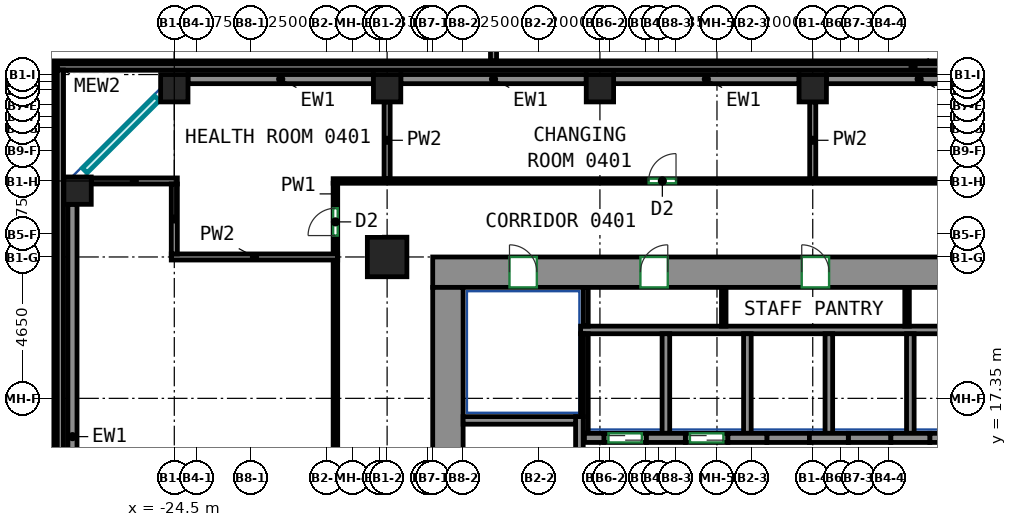
"""IFC4 building model, lengths in metres.
Left out: names, types, materials, properties, quantities, classifications, styles, units other than length and angle.
Written with IfcOpenShell. Run it as: python <this file> out.ifc"""

import sys

from ifc_helpers import new_model, si_unit, direction, frame, frame_2d, origin, origin_2d, place, context, subcontext, project, spatial, rectangle, extrude, source, transform, mapped, element, fill, save


model = new_model("IFC4")
c1 = context("Model", 3, precision=1e-05, world=origin(), true_north=direction((0.0, 1.0)))
c2 = subcontext(c1, "Body", "Model", "MODEL_VIEW")
j1 = project(units=[si_unit("LENGTHUNIT", "METRE"), si_unit("PLANEANGLEUNIT", "RADIAN")], contexts=[c1])
p1 = place(None, origin())
s1 = spatial("IfcSite", under=j1, at=p1, CompositionType="ELEMENT")
p2 = place(p1, origin())
s2 = spatial("IfcBuilding", under=s1, at=p2, CompositionType="ELEMENT")
p3 = place(p2, frame((0.0, 0.0, 22.5)))
s3 = spatial("IfcBuildingStorey", under=s2, at=p3, CompositionType="ELEMENT", Elevation=22.5)
m1 = source(origin(), c2, "Body", "SweptSolid", [
    extrude(rectangle(XDim=0.9, YDim=0.9, at=origin_2d()), origin(), (0.0, 0.0, 1.0), 4.22),
])
for number, where, z_axis, x_axis in (
    (1, (-27.682, 24.182, 0.0), (0.0, 0.0, 1.0), (1.0, 0.0, 0.0)),
    (2, (-24.5, 27.55, 0.0), (0.0, 0.0, 1.0), (1.0, 0.0, 0.0)),
):
    element("IfcColumn", number, at=place(p3, frame(where, z_axis=z_axis, x_axis=x_axis)), inside=s3, PredefinedType="COLUMN", context=c2, shape_type="MappedRepresentation", body=[
        mapped(m1, transform((0.0, 0.0, 0.0))),
    ])
m2 = source(origin(), c2, "Body", "SweptSolid", [
    extrude(rectangle(XDim=1.3, YDim=1.3, at=origin_2d()), origin(), (0.0, 0.0, 1.0), 4.22),
])
p4 = place(p3, frame((-17.5, 22.0, 0.0), z_axis=(0.0, 0.0, 1.0), x_axis=(1.0, 0.0, 0.0)))
e3 = element("IfcColumn", 3, at=p4, inside=s3, PredefinedType="COLUMN", context=c2, shape_type="MappedRepresentation", body=[
    mapped(m2, transform((0.0, 0.0, 0.0))),
])
for number, where, z_axis, x_axis in (
    (4, (-17.5, 27.55, 0.0), (0.0, 0.0, 1.0), (1.0, 0.0, 0.0)),
    (5, (-10.5, 27.55, 0.0), (0.0, 0.0, 1.0), (1.0, 0.0, 0.0)),
    (6, (-3.5, 27.55, 0.0), (0.0, 0.0, 1.0), (1.0, 0.0, 0.0)),
):
    element("IfcColumn", number, at=place(p3, frame(where, z_axis=z_axis, x_axis=x_axis)), inside=s3, PredefinedType="COLUMN", context=c2, shape_type="MappedRepresentation", body=[
        mapped(m1, transform((0.0, 0.0, 0.0))),
    ])
m3 = source(origin(), c2, "Body", "SweptSolid", [
    extrude(rectangle(XDim=34.1, YDim=1.0, at=frame_2d((17.05, 0.0))), origin(), (0.0, 0.0, 1.0), 4.22),
])
p5 = place(p3, frame((-16.0, 21.5, 0.0), z_axis=(0.0, 0.0, 1.0), x_axis=(1.0, 0.0, 0.0)))
e7 = element("IfcWall", 7, at=p5, inside=s3, PredefinedType="SHEAR", context=c2, shape_type="MappedRepresentation", body=[
    mapped(m3, transform((0.0, 0.0, 0.0))),
])
p6 = place(p5, frame((6.831, 0.0, 0.0)))
e8 = element("IfcOpeningElement", 8, at=p6, cuts=e7, PredefinedType="OPENING", context=c2, shape_type="SweptSolid", body=[
    extrude(rectangle(XDim=0.9, YDim=2.1, at=frame_2d((0.45, 1.05))), frame((0.0, 0.51, 0.0), z_axis=(0.0, -1.0, 0.0), x_axis=(1.0, 0.0, 0.0)), (0.0, 0.0, 1.0), 1.02),
])
p7 = place(p5, frame((12.138, 0.0, 0.0)))
e9 = element("IfcOpeningElement", 9, at=p7, cuts=e7, PredefinedType="OPENING", context=c2, shape_type="SweptSolid", body=[
    extrude(rectangle(XDim=0.9, YDim=2.1, at=frame_2d((0.45, 1.05))), frame((0.0, 0.51, 0.0), z_axis=(0.0, -1.0, 0.0), x_axis=(1.0, 0.0, 0.0)), (0.0, 0.0, 1.0), 1.02),
])
p8 = place(p5, frame((17.565, 0.0, 0.0)))
e10 = element("IfcOpeningElement", 10, at=p8, cuts=e7, PredefinedType="OPENING", context=c2, shape_type="SweptSolid", body=[
    extrude(rectangle(XDim=0.9, YDim=2.1, at=frame_2d((0.45, 1.05))), frame((0.0, 0.51, 0.0), z_axis=(0.0, -1.0, 0.0), x_axis=(1.0, 0.0, 0.0)), (0.0, 0.0, 1.0), 1.02),
])
p9 = place(p5, frame((21.786, 0.0, 0.0)))
e11 = element("IfcOpeningElement", 11, at=p9, cuts=e7, PredefinedType="OPENING", context=c2, shape_type="SweptSolid", body=[
    extrude(rectangle(XDim=0.9, YDim=2.1, at=frame_2d((0.45, 1.05))), frame((0.0, 0.51, 0.0), z_axis=(0.0, -1.0, 0.0), x_axis=(1.0, 0.0, 0.0)), (0.0, 0.0, 1.0), 1.02),
])
p10 = place(p5, frame((26.127, 0.0, 0.0)))
e12 = element("IfcOpeningElement", 12, at=p10, cuts=e7, PredefinedType="OPENING", context=c2, shape_type="SweptSolid", body=[
    extrude(rectangle(XDim=0.9, YDim=2.1, at=frame_2d((0.45, 1.05))), frame((0.0, 0.51, 0.0), z_axis=(0.0, -1.0, 0.0), x_axis=(1.0, 0.0, 0.0)), (0.0, 0.0, 1.0), 1.02),
])
p11 = place(p5, frame((2.525, 0.0, 0.0)))
e13 = element("IfcOpeningElement", 13, at=p11, cuts=e7, PredefinedType="OPENING", context=c2, shape_type="SweptSolid", body=[
    extrude(rectangle(XDim=0.9, YDim=2.1, at=frame_2d((0.45, 1.05))), frame((0.0, 0.51, 0.0), z_axis=(0.0, -1.0, 0.0), x_axis=(1.0, 0.0, 0.0)), (0.0, 0.0, 1.0), 1.02),
])
p12 = place(p5, frame((30.675, 0.0, 0.0)))
e14 = element("IfcOpeningElement", 14, at=p12, cuts=e7, PredefinedType="OPENING", context=c2, shape_type="SweptSolid", body=[
    extrude(rectangle(XDim=0.9, YDim=2.1, at=frame_2d((0.45, 1.05))), frame((0.0, 0.51, 0.0), z_axis=(0.0, -1.0, 0.0), x_axis=(1.0, 0.0, 0.0)), (0.0, 0.0, 1.0), 1.02),
])
m4 = source(origin(), c2, "Body", "SweptSolid", [
    extrude(rectangle(XDim=12.0, YDim=1.0, at=frame_2d((6.0, 0.0))), origin(), (0.0, 0.0, 1.0), 4.22),
])
p13 = place(p3, frame((-15.5, 9.0, 0.0), z_axis=(0.0, 0.0, 1.0), x_axis=(0.0, 1.0, 0.0)))
e15 = element("IfcWall", 15, at=p13, inside=s3, PredefinedType="SHEAR", context=c2, shape_type="MappedRepresentation", body=[
    mapped(m4, transform((0.0, 0.0, 0.0))),
])
m5 = source(origin(), c2, "Body", "SweptSolid", [
    extrude(rectangle(XDim=7.75, YDim=0.25, at=frame_2d((3.875, 0.0))), origin(), (0.0, 0.0, 1.0), 4.22),
])
p14 = place(p3, frame((-11.175, 9.0, 0.0), z_axis=(0.0, 0.0, 1.0), x_axis=(0.0, 1.0, 0.0)))
e16 = element("IfcWall", 16, at=p14, inside=s3, PredefinedType="SHEAR", context=c2, shape_type="MappedRepresentation", body=[
    mapped(m5, transform((0.0, 0.0, 0.0))),
])
m6 = source(origin(), c2, "Body", "SweptSolid", [
    extrude(rectangle(XDim=3.7, YDim=0.25, at=frame_2d((1.85, 0.0))), origin(), (0.0, 0.0, 1.0), 4.22),
])
p15 = place(p3, frame((-15.0, 16.625, 0.0), z_axis=(0.0, 0.0, 1.0), x_axis=(1.0, 0.0, 0.0)))
e17 = element("IfcWall", 17, at=p15, inside=s3, PredefinedType="SHEAR", context=c2, shape_type="MappedRepresentation", body=[
    mapped(m6, transform((0.0, 0.0, 0.0))),
])
m7 = source(origin(), c2, "Body", "SweptSolid", [
    extrude(rectangle(XDim=0.64, YDim=0.3, at=frame_2d((0.32, 0.0))), origin(), (0.0, 0.0, 1.0), 4.22),
])
p16 = place(p3, frame((-11.01, 16.05, 0.0), z_axis=(0.0, 0.0, 1.0), x_axis=(1.0, 0.0, 0.0)))
e18 = element("IfcWall", 18, at=p16, inside=s3, PredefinedType="SHEAR", context=c2, shape_type="MappedRepresentation", body=[
    mapped(m7, transform((0.0, 0.0, 0.0))),
])
m8 = source(origin(), c2, "Body", "SweptSolid", [
    extrude(rectangle(XDim=1.28, YDim=0.3, at=frame_2d((0.64, 0.0))), origin(), (0.0, 0.0, 1.0), 4.22),
])
for number, where, z_axis, x_axis in (
    (19, (-8.97, 16.05, 0.0), (0.0, 0.0, 1.0), (1.0, 0.0, 0.0)),
    (20, (-6.29, 16.05, 0.0), (0.0, 0.0, 1.0), (1.0, 0.0, 0.0)),
    (21, (-3.61, 16.05, 0.0), (0.0, 0.0, 1.0), (1.0, 0.0, 0.0)),
    (22, (-0.93, 16.05, 0.0), (0.0, 0.0, 1.0), (1.0, 0.0, 0.0)),
):
    element("IfcWall", number, at=place(p3, frame(where, z_axis=z_axis, x_axis=x_axis)), inside=s3, PredefinedType="SHEAR", context=c2, shape_type="MappedRepresentation", body=[
        mapped(m8, transform((0.0, 0.0, 0.0))),
    ])
m9 = source(origin(), c2, "Body", "SweptSolid", [
    extrude(rectangle(XDim=6.1, YDim=0.3, at=frame_2d((3.05, 0.0))), origin(), (0.0, 0.0, 1.0), 4.22),
])
for number, where, z_axis, x_axis in (
    (23, (3.05, 27.85, 0.0), (0.0, 0.0, 1.0), (-1.0, 0.0, 0.0)),
    (24, (-3.95, 27.85, 0.0), (0.0, 0.0, 1.0), (-1.0, 0.0, 0.0)),
    (25, (-10.95, 27.85, 0.0), (0.0, 0.0, 1.0), (-1.0, 0.0, 0.0)),
    (26, (-17.95, 27.85, 0.0), (0.0, 0.0, 1.0), (-1.0, 0.0, 0.0)),
):
    element("IfcWall", number, at=place(p3, frame(where, z_axis=z_axis, x_axis=x_axis)), inside=s3, PredefinedType="SOLIDWALL", context=c2, shape_type="MappedRepresentation", body=[
        mapped(m9, transform((0.0, 0.0, 0.0))),
    ])
m10 = source(origin(), c2, "Body", "SweptSolid", [
    extrude(rectangle(XDim=15.282, YDim=0.3, at=frame_2d((7.641, 0.0))), origin(), (0.0, 0.0, 1.0), 4.22),
])
p17 = place(p3, frame((-27.85, 23.732, 0.0), z_axis=(0.0, 0.0, 1.0), x_axis=(0.0, -1.0, 0.0)))
e27 = element("IfcWall", 27, at=p17, inside=s3, PredefinedType="SOLIDWALL", context=c2, shape_type="MappedRepresentation", body=[
    mapped(m10, transform((0.0, 0.0, 0.0))),
])
m11 = source(origin(), c2, "Body", "SweptSolid", [
    extrude(rectangle(XDim=56.3, YDim=0.3, at=frame_2d((28.15, 0.0))), origin(), (0.0, 0.0, 1.0), 4.22),
])
p18 = place(p3, frame((27.85, 28.3, 0.0), z_axis=(0.0, 0.0, 1.0), x_axis=(-1.0, 0.0, 0.0)))
e28 = element("IfcWall", 28, at=p18, inside=s3, PredefinedType="SOLIDWALL", context=c2, shape_type="MappedRepresentation", body=[
    mapped(m11, transform((0.0, 0.0, 0.0))),
])
m12 = source(origin(), c2, "Body", "SweptSolid", [
    extrude(rectangle(XDim=56.3, YDim=0.3, at=frame_2d((28.15, 0.0))), origin(), (0.0, 0.0, 1.0), 4.22),
])
p19 = place(p3, frame((-28.3, 28.15, 0.0), z_axis=(0.0, 0.0, 1.0), x_axis=(0.0, -1.0, 0.0)))
e29 = element("IfcWall", 29, at=p19, inside=s3, PredefinedType="SOLIDWALL", context=c2, shape_type="MappedRepresentation", body=[
    mapped(m12, transform((0.0, 0.0, 0.0))),
])
m13 = source(origin(), c2, "Body", "SweptSolid", [
    extrude(rectangle(XDim=56.3, YDim=0.2, at=frame_2d((28.15, 0.0))), origin(), (0.0, 0.0, 1.0), 1.1),
])
p20 = place(p3, frame((27.95, 28.25, 4.5), z_axis=(0.0, 0.0, 1.0), x_axis=(-1.0, 0.0, 0.0)))
e30 = element("IfcWall", 30, at=p20, inside=s3, PredefinedType="PARAPET", context=c2, shape_type="MappedRepresentation", body=[
    mapped(m13, transform((0.0, 0.0, 0.0))),
])
m14 = source(origin(), c2, "Body", "SweptSolid", [
    extrude(rectangle(XDim=56.3, YDim=0.2, at=frame_2d((28.15, 0.0))), origin(), (0.0, 0.0, 1.0), 1.1),
])
p21 = place(p3, frame((-28.25, 28.15, 4.5), z_axis=(0.0, 0.0, 1.0), x_axis=(0.0, -1.0, 0.0)))
e31 = element("IfcWall", 31, at=p21, inside=s3, PredefinedType="PARAPET", context=c2, shape_type="MappedRepresentation", body=[
    mapped(m14, transform((0.0, 0.0, 0.0))),
])
m15 = source(origin(), c2, "Body", "SweptSolid", [
    extrude(rectangle(XDim=1.4, YDim=0.3, at=frame_2d((0.7, 0.0))), origin(), (0.0, 0.0, 1.0), 4.22),
])
p22 = place(p3, frame((-10.37, 16.05, 0.0), z_axis=(0.0, 0.0, 1.0), x_axis=(1.0, 0.0, 0.0)))
e32 = element("IfcWall", 32, at=p22, inside=s3, PredefinedType="PARTITIONING", context=c2, shape_type="MappedRepresentation", body=[
    mapped(m15, transform((0.0, 0.0, 0.0))),
])
p23 = place(p22, frame((0.15, 0.0, 0.0)))
e33 = element("IfcOpeningElement", 33, at=p23, cuts=e32, PredefinedType="OPENING", context=c2, shape_type="SweptSolid", body=[
    extrude(rectangle(XDim=1.1, YDim=2.1, at=frame_2d((0.55, 1.05))), frame((0.0, 0.16, 0.0), z_axis=(0.0, -1.0, 0.0), x_axis=(1.0, 0.0, 0.0)), (0.0, 0.0, 1.0), 0.32),
])
m16 = source(origin(), c2, "Body", "SweptSolid", [
    extrude(rectangle(XDim=1.4, YDim=0.3, at=frame_2d((0.7, 0.0))), origin(), (0.0, 0.0, 1.0), 4.22),
])
p24 = place(p3, frame((-7.69, 16.05, 0.0), z_axis=(0.0, 0.0, 1.0), x_axis=(1.0, 0.0, 0.0)))
e34 = element("IfcWall", 34, at=p24, inside=s3, PredefinedType="PARTITIONING", context=c2, shape_type="MappedRepresentation", body=[
    mapped(m16, transform((0.0, 0.0, 0.0))),
])
p25 = place(p24, frame((0.15, 0.0, 0.0)))
e35 = element("IfcOpeningElement", 35, at=p25, cuts=e34, PredefinedType="OPENING", context=c2, shape_type="SweptSolid", body=[
    extrude(rectangle(XDim=1.1, YDim=2.1, at=frame_2d((0.55, 1.05))), frame((0.0, 0.16, 0.0), z_axis=(0.0, -1.0, 0.0), x_axis=(1.0, 0.0, 0.0)), (0.0, 0.0, 1.0), 0.32),
])
p26 = place(p3, frame((-5.01, 16.05, 0.0), z_axis=(0.0, 0.0, 1.0), x_axis=(1.0, 0.0, 0.0)))
e36 = element("IfcWall", 36, at=p26, inside=s3, PredefinedType="PARTITIONING", context=c2, shape_type="MappedRepresentation", body=[
    mapped(m16, transform((0.0, 0.0, 0.0))),
])
p27 = place(p3, frame((-2.33, 16.05, 0.0), z_axis=(0.0, 0.0, 1.0), x_axis=(1.0, 0.0, 0.0)))
e37 = element("IfcWall", 37, at=p27, inside=s3, PredefinedType="PARTITIONING", context=c2, shape_type="MappedRepresentation", body=[
    mapped(m15, transform((0.0, 0.0, 0.0))),
])
p28 = place(p3, frame((0.35, 16.05, 0.0), z_axis=(0.0, 0.0, 1.0), x_axis=(1.0, 0.0, 0.0)))
e38 = element("IfcWall", 38, at=p28, inside=s3, PredefinedType="PARTITIONING", context=c2, shape_type="MappedRepresentation", body=[
    mapped(m16, transform((0.0, 0.0, 0.0))),
])
m17 = source(origin(), c2, "Body", "SweptSolid", [
    extrude(rectangle(XDim=24.37, YDim=0.25, at=frame_2d((12.185, 0.0))), origin(), (0.0, 0.0, 1.0), 4.22),
])
p29 = place(p3, frame((-11.135, 19.6, 0.0), z_axis=(0.0, 0.0, 1.0), x_axis=(1.0, 0.0, 0.0)))
e39 = element("IfcWall", 39, at=p29, inside=s3, PredefinedType="PARTITIONING", context=c2, shape_type="MappedRepresentation", body=[
    mapped(m17, transform((0.0, 0.0, 0.0))),
])
m18 = source(origin(), c2, "Body", "SweptSolid", [
    extrude(rectangle(XDim=3.275, YDim=0.165, at=frame_2d((1.638, 0.0))), origin(), (0.0, 0.0, 1.0), 4.22),
])
p30 = place(p3, frame((-10.968, 16.2, 0.0), z_axis=(0.0, 0.0, 1.0), x_axis=(0.0, 1.0, 0.0)))
e40 = element("IfcWall", 40, at=p30, inside=s3, PredefinedType="PARTITIONING", context=c2, shape_type="MappedRepresentation", body=[
    mapped(m18, transform((0.0, 0.0, 0.0))),
])
m19 = source(origin(), c2, "Body", "SweptSolid", [
    extrude(rectangle(XDim=1.275, YDim=0.165, at=frame_2d((0.637, 0.0))), origin(), (0.0, 0.0, 1.0), 4.22),
])
p31 = place(p3, frame((-10.968, 19.725, 0.0), z_axis=(0.0, 0.0, 1.0), x_axis=(0.0, 1.0, 0.0)))
e41 = element("IfcWall", 41, at=p31, inside=s3, PredefinedType="PARTITIONING", context=c2, shape_type="MappedRepresentation", body=[
    mapped(m19, transform((0.0, 0.0, 0.0))),
])
m20 = source(origin(), c2, "Body", "SweptSolid", [
    extrude(rectangle(XDim=3.275, YDim=0.25, at=frame_2d((1.638, 0.0))), origin(), (0.0, 0.0, 1.0), 4.22),
])
p32 = place(p3, frame((-0.29, 16.2, 0.0), z_axis=(0.0, 0.0, 1.0), x_axis=(0.0, 1.0, 0.0)))
e42 = element("IfcWall", 42, at=p32, inside=s3, PredefinedType="PARTITIONING", context=c2, shape_type="MappedRepresentation", body=[
    mapped(m20, transform((0.0, 0.0, 0.0))),
])
m21 = source(origin(), c2, "Body", "SweptSolid", [
    extrude(rectangle(XDim=2.725, YDim=0.085, at=frame_2d((1.363, 0.0))), origin(), (0.0, 0.0, 1.0), 4.22),
])
p33 = place(p3, frame((-11.093, 16.75, 0.0), z_axis=(0.0, 0.0, 1.0), x_axis=(0.0, 1.0, 0.0)))
e43 = element("IfcWall", 43, at=p33, inside=s3, PredefinedType="PARTITIONING", context=c2, shape_type="MappedRepresentation", body=[
    mapped(m21, transform((0.0, 0.0, 0.0))),
])
for number, where, z_axis, x_axis in (
    (44, (-2.97, 16.2, 0.0), (0.0, 0.0, 1.0), (0.0, 1.0, 0.0)),
    (45, (-5.65, 16.2, 0.0), (0.0, 0.0, 1.0), (0.0, 1.0, 0.0)),
    (46, (-8.33, 16.2, 0.0), (0.0, 0.0, 1.0), (0.0, 1.0, 0.0)),
):
    element("IfcWall", number, at=place(p3, frame(where, z_axis=z_axis, x_axis=x_axis)), inside=s3, PredefinedType="PARTITIONING", context=c2, shape_type="MappedRepresentation", body=[
        mapped(m20, transform((0.0, 0.0, 0.0))),
    ])
m22 = source(origin(), c2, "Body", "SweptSolid", [
    extrude(rectangle(XDim=1.275, YDim=0.15, at=frame_2d((0.637, 0.0))), origin(), (0.0, 0.0, 1.0), 4.22),
])
for number, where, z_axis, x_axis in (
    (47, (-6.427, 19.725, 0.0), (0.0, 0.0, 1.0), (0.0, 1.0, 0.0)),
    (48, (-0.397, 19.725, 0.0), (0.0, 0.0, 1.0), (0.0, 1.0, 0.0)),
):
    element("IfcWall", number, at=place(p3, frame(where, z_axis=z_axis, x_axis=x_axis)), inside=s3, PredefinedType="PARTITIONING", context=c2, shape_type="MappedRepresentation", body=[
        mapped(m22, transform((0.0, 0.0, 0.0))),
    ])
p34 = place(p3, frame((-19.2, 22.09, 0.0), z_axis=(0.0, 0.0, 1.0), x_axis=(0.0, 1.0, 0.0)))
e49 = element("IfcWall", 49, at=p34, inside=s3, PredefinedType="PARTITIONING", context=c2, shape_type="SweptSolid", body=[
    extrude(rectangle(XDim=2.335, YDim=0.15, at=frame_2d((1.167, 0.0))), origin(), (0.0, 0.0, 1.0), 4.22),
])
p35 = place(p34, frame((0.614, 0.0, 0.0)))
e50 = element("IfcOpeningElement", 50, at=p35, cuts=e49, PredefinedType="OPENING", context=c2, shape_type="SweptSolid", body=[
    extrude(rectangle(XDim=0.9, YDim=2.1, at=frame_2d((0.45, 1.05))), frame((0.0, 0.085, 0.0), z_axis=(0.0, -1.0, 0.0), x_axis=(1.0, 0.0, 0.0)), (0.0, 0.0, 1.0), 0.17),
])
p36 = place(p3, frame((-19.275, 24.5, 0.0), z_axis=(0.0, 0.0, 1.0), x_axis=(1.0, 0.0, 0.0)))
e51 = element("IfcWall", 51, at=p36, inside=s3, PredefinedType="PARTITIONING", context=c2, shape_type="SweptSolid", body=[
    extrude(rectangle(XDim=40.35, YDim=0.15, at=frame_2d((20.175, 0.0))), origin(), (0.0, 0.0, 1.0), 3.57),
])
p37 = place(p36, frame((10.378, 0.0, 0.0)))
e52 = element("IfcOpeningElement", 52, at=p37, cuts=e51, PredefinedType="OPENING", context=c2, shape_type="SweptSolid", body=[
    extrude(rectangle(XDim=0.9, YDim=2.1, at=frame_2d((0.45, 1.05))), frame((0.0, 0.085, 0.0), z_axis=(0.0, -1.0, 0.0), x_axis=(1.0, 0.0, 0.0)), (0.0, 0.0, 1.0), 0.17),
])
p38 = place(p36, frame((23.292, 0.0, 0.0)))
e53 = element("IfcOpeningElement", 53, at=p38, cuts=e51, PredefinedType="OPENING", context=c2, shape_type="SweptSolid", body=[
    extrude(rectangle(XDim=1.0, YDim=2.1, at=frame_2d((0.5, 1.05))), frame((0.0, 0.085, 0.0), z_axis=(0.0, -1.0, 0.0), x_axis=(1.0, 0.0, 0.0)), (0.0, 0.0, 1.0), 0.17),
])
p39 = place(p3, frame((-19.2, 8.09, 0.0), z_axis=(0.0, 0.0, 1.0), x_axis=(0.0, 1.0, 0.0)))
e54 = element("IfcWall", 54, at=p39, inside=s3, PredefinedType="PARTITIONING", context=c2, shape_type="SweptSolid", body=[
    extrude(rectangle(XDim=13.82, YDim=0.15, at=frame_2d((6.91, 0.0))), origin(), (0.0, 0.0, 1.0), 4.22),
])
p40 = place(p39, frame((4.206, 0.0, 0.0)))
e55 = element("IfcOpeningElement", 55, at=p40, cuts=e54, PredefinedType="OPENING", context=c2, shape_type="SweptSolid", body=[
    extrude(rectangle(XDim=0.9, YDim=2.1, at=frame_2d((0.45, 1.05))), frame((0.0, 0.085, 0.0), z_axis=(0.0, -1.0, 0.0), x_axis=(1.0, 0.0, 0.0)), (0.0, 0.0, 1.0), 0.17),
])
for number, where, z_axis, x_axis in (
    (56, (-3.5, 27.1, 0.0), (0.0, 0.0, 1.0), (0.0, -1.0, 0.0)),
    (57, (-17.5, 24.576, 0.0), (0.0, 0.0, 1.0), (0.0, 1.0, 0.0)),
):
    element("IfcWall", number, at=place(p3, frame(where, z_axis=z_axis, x_axis=x_axis)), inside=s3, PredefinedType="PARTITIONING", context=c2, shape_type="SweptSolid", body=[
        extrude(rectangle(XDim=2.524, YDim=0.2, at=frame_2d((1.262, 0.0))), origin(), (0.0, 0.0, 1.0), 4.22),
    ])
p41 = place(p3, frame((-27.232, 24.5, 0.0), z_axis=(0.0, 0.0, 1.0), x_axis=(1.0, 0.0, 0.0)))
e58 = element("IfcWall", 58, at=p41, inside=s3, PredefinedType="PARTITIONING", context=c2, shape_type="SweptSolid", body=[
    extrude(rectangle(XDim=2.832, YDim=0.2, at=frame_2d((1.416, 0.0))), origin(), (0.0, 0.0, 1.0), 3.57),
])
p42 = place(p3, frame((-24.6, 22.0, 0.0), z_axis=(0.0, 0.0, 1.0), x_axis=(1.0, 0.0, 0.0)))
e59 = element("IfcWall", 59, at=p42, inside=s3, PredefinedType="PARTITIONING", context=c2, shape_type="SweptSolid", body=[
    extrude(rectangle(XDim=5.474, YDim=0.2, at=frame_2d((2.737, 0.0))), origin(), (0.0, 0.0, 1.0), 4.22),
])
p43 = place(p3, frame((-24.5, 24.4, 0.0), z_axis=(0.0, 0.0, 1.0), x_axis=(0.0, -1.0, 0.0)))
e60 = element("IfcWall", 60, at=p43, inside=s3, PredefinedType="PARTITIONING", context=c2, shape_type="SweptSolid", body=[
    extrude(rectangle(XDim=2.3, YDim=0.2, at=frame_2d((1.15, 0.0))), origin(), (0.0, 0.0, 1.0), 3.57),
])
m23 = source(origin(), c2, "Body", "SweptSolid", [
    extrude(rectangle(XDim=10.1, YDim=0.2, at=frame_2d((5.05, 0.0))), origin(), (0.0, 0.0, 1.0), 3.42),
])
for number, where, z_axis, x_axis in (
    (61, (-38.55, 28.15, 0.0), (0.0, 0.0, 1.0), (1.0, 0.0, 0.0)),
    (62, (-14.0, 38.55, 0.0), (0.0, 0.0, 1.0), (0.0, -1.0, 0.0)),
):
    element("IfcWall", number, at=place(p3, frame(where, z_axis=z_axis, x_axis=x_axis)), inside=s3, PredefinedType="PARTITIONING", context=c2, shape_type="MappedRepresentation", body=[
        mapped(m23, transform((0.0, 0.0, 0.0))),
    ])
p44 = place(p23, origin())
e63 = element("IfcDoor", 63, at=p44, inside=s3, OperationType="DOUBLE_DOOR_SLIDING", PredefinedType="DOOR", context=c2, shape_type="SweptSolid", body=[
    extrude(rectangle(XDim=1.1, YDim=2.1, at=frame_2d((0.55, 1.05))), frame((0.0, 0.025, 0.0), z_axis=(0.0, -1.0, 0.0), x_axis=(1.0, 0.0, 0.0)), (0.0, 0.0, 1.0), 0.05),
])
fill(e33, e63)
p45 = place(p25, origin())
e64 = element("IfcDoor", 64, at=p45, inside=s3, OperationType="DOUBLE_DOOR_SLIDING", PredefinedType="DOOR", context=c2, shape_type="SweptSolid", body=[
    extrude(rectangle(XDim=1.1, YDim=2.1, at=frame_2d((0.55, 1.05))), frame((0.0, 0.025, 0.0), z_axis=(0.0, -1.0, 0.0), x_axis=(1.0, 0.0, 0.0)), (0.0, 0.0, 1.0), 0.05),
])
fill(e35, e64)
p46 = place(p6, origin())
e65 = element("IfcDoor", 65, at=p46, inside=s3, OperationType="SINGLE_SWING_RIGHT", PredefinedType="DOOR", context=c2, shape_type="SweptSolid", body=[
    extrude(rectangle(XDim=0.9, YDim=2.1, at=frame_2d((0.45, 1.05))), frame((0.0, -0.355, 0.0), z_axis=(0.0, -1.0, 0.0), x_axis=(1.0, 0.0, 0.0)), (0.0, 0.0, 1.0), 0.05),
])
fill(e8, e65)
p47 = place(p7, origin())
e66 = element("IfcDoor", 66, at=p47, inside=s3, OperationType="SINGLE_SWING_LEFT", PredefinedType="DOOR", context=c2, shape_type="SweptSolid", body=[
    extrude(rectangle(XDim=0.9, YDim=2.1, at=frame_2d((0.45, 1.05))), frame((0.0, -0.355, 0.0), z_axis=(0.0, -1.0, 0.0), x_axis=(1.0, 0.0, 0.0)), (0.0, 0.0, 1.0), 0.05),
])
fill(e9, e66)
p48 = place(p11, origin())
e67 = element("IfcDoor", 67, at=p48, inside=s3, OperationType="SINGLE_SWING_LEFT", PredefinedType="DOOR", context=c2, shape_type="SweptSolid", body=[
    extrude(rectangle(XDim=0.9, YDim=2.1, at=frame_2d((0.45, 1.05))), frame((0.0, -0.355, 0.0), z_axis=(0.0, -1.0, 0.0), x_axis=(1.0, 0.0, 0.0)), (0.0, 0.0, 1.0), 0.05),
])
fill(e13, e67)
p49 = place(p35, origin())
e68 = element("IfcDoor", 68, at=p49, inside=s3, OperationType="SINGLE_SWING_LEFT", PredefinedType="DOOR", context=c2, shape_type="SweptSolid", body=[
    extrude(rectangle(XDim=0.9, YDim=2.1, at=frame_2d((0.45, 1.05))), frame((0.0, 0.025, 0.0), z_axis=(0.0, -1.0, 0.0), x_axis=(1.0, 0.0, 0.0)), (0.0, 0.0, 1.0), 0.05),
])
fill(e50, e68)
p50 = place(p37, origin())
e69 = element("IfcDoor", 69, at=p50, inside=s3, OperationType="SINGLE_SWING_RIGHT", PredefinedType="DOOR", context=c2, shape_type="SweptSolid", body=[
    extrude(rectangle(XDim=0.9, YDim=2.1, at=frame_2d((0.45, 1.05))), frame((0.0, 0.025, 0.0), z_axis=(0.0, -1.0, 0.0), x_axis=(1.0, 0.0, 0.0)), (0.0, 0.0, 1.0), 0.05),
])
fill(e52, e69)
save(model, sys.argv[1])
